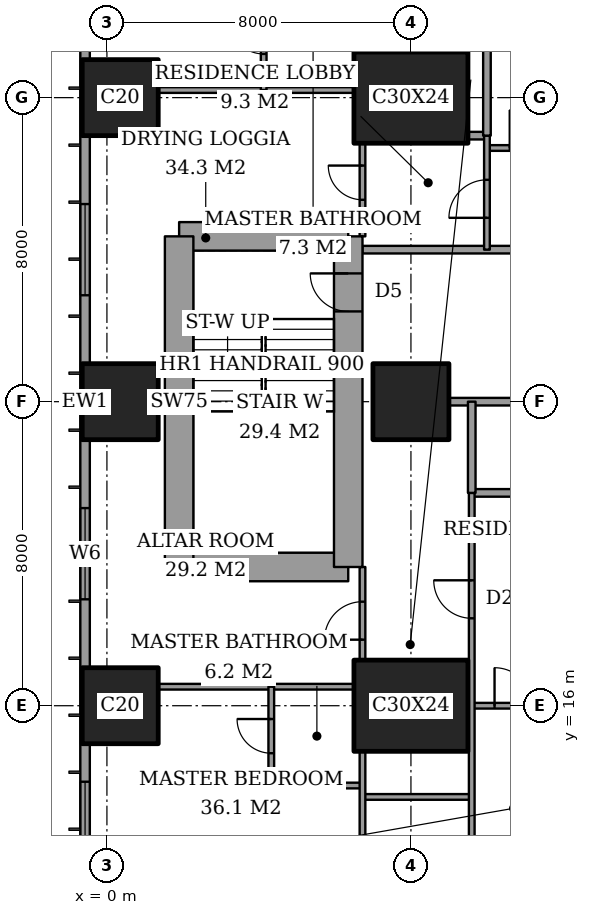
"""IFC4 building model, lengths in metres.
Left out: names, types, materials, properties, quantities, classifications, styles, units other than length and angle.
Written with IfcOpenShell. Run it as: python <this file> out.ifc"""

import sys

from ifc_helpers import new_model, si_unit, direction, frame, frame_2d, origin, origin_2d, place, context, subcontext, project, spatial, rectangle, extrude, element, fill, save


model = new_model("IFC4")
c1 = context("Model", 3, precision=1e-05, world=origin(), true_north=direction((0.0, 1.0)))
c2 = subcontext(c1, "Body", "Model", "MODEL_VIEW")
j1 = project(units=[si_unit("LENGTHUNIT", "METRE"), si_unit("PLANEANGLEUNIT", "RADIAN")], contexts=[c1])
p1 = place(None, origin())
s1 = spatial("IfcSite", under=j1, at=p1, CompositionType="ELEMENT")
p2 = place(p1, origin())
s2 = spatial("IfcBuilding", under=s1, at=p2, CompositionType="ELEMENT")
p3 = place(p2, frame((0.0, 0.0, 83.6)))
s3 = spatial("IfcBuildingStorey", under=s2, at=p3, CompositionType="ELEMENT", Elevation=83.6)
for number, where, z_axis, x_axis in (
    (1, (0.35, 16.0, 0.0), (0.0, 0.0, 1.0), (1.0, 0.0, 0.0)),
    (2, (0.35, 24.0, 0.0), (0.0, 0.0, 1.0), (1.0, 0.0, 0.0)),
    (3, (0.35, 32.0, 0.0), (0.0, 0.0, 1.0), (1.0, 0.0, 0.0)),
):
    element("IfcColumn", number, at=place(p3, frame(where, z_axis=z_axis, x_axis=x_axis)), inside=s3, PredefinedType="COLUMN", context=c2, shape_type="SweptSolid", body=[
        extrude(rectangle(XDim=2.0, YDim=2.0, at=origin_2d()), origin(), (0.0, 0.0, 1.0), 3.6),
    ])
p4 = place(p3, frame((8.0, 16.0, 0.0), z_axis=(0.0, 0.0, 1.0), x_axis=(1.0, 0.0, 0.0)))
e4 = element("IfcColumn", 4, at=p4, inside=s3, PredefinedType="COLUMN", context=c2, shape_type="SweptSolid", body=[
    extrude(rectangle(XDim=3.0, YDim=2.4, at=origin_2d()), origin(), (0.0, 0.0, 1.0), 3.6),
])
p5 = place(p3, frame((8.0, 24.0, 0.0), z_axis=(0.0, 0.0, 1.0), x_axis=(1.0, 0.0, 0.0)))
e5 = element("IfcColumn", 5, at=p5, inside=s3, PredefinedType="COLUMN", context=c2, shape_type="SweptSolid", body=[
    extrude(rectangle(XDim=2.0, YDim=2.0, at=origin_2d()), origin(), (0.0, 0.0, 1.0), 3.6),
])
p6 = place(p3, frame((8.0, 32.0, 0.0), z_axis=(0.0, 0.0, 1.0), x_axis=(1.0, 0.0, 0.0)))
e6 = element("IfcColumn", 6, at=p6, inside=s3, PredefinedType="COLUMN", context=c2, shape_type="SweptSolid", body=[
    extrude(rectangle(XDim=3.0, YDim=2.4, at=origin_2d()), origin(), (0.0, 0.0, 1.0), 3.6),
])
p7 = place(p3, frame((1.9, 19.65, 0.0), z_axis=(0.0, 0.0, 1.0), x_axis=(1.0, 0.0, 0.0)))
e7 = element("IfcWall", 7, at=p7, inside=s3, PredefinedType="SHEAR", context=c2, shape_type="SweptSolid", body=[
    extrude(rectangle(XDim=4.45, YDim=0.75, at=frame_2d((2.225, 0.0))), origin(), (0.0, 0.0, 1.0), 3.6),
])
p8 = place(p3, frame((6.35, 19.65, 0.0), z_axis=(0.0, 0.0, 1.0), x_axis=(0.0, 1.0, 0.0)))
e8 = element("IfcWall", 8, at=p8, inside=s3, PredefinedType="SHEAR", context=c2, shape_type="SweptSolid", body=[
    extrude(rectangle(XDim=8.7, YDim=0.75, at=frame_2d((4.35, 0.0))), origin(), (0.0, 0.0, 1.0), 3.6),
])
p9 = place(p8, frame((6.725, 0.0, 0.0)))
e9 = element("IfcOpeningElement", 9, at=p9, cuts=e8, PredefinedType="OPENING", context=c2, shape_type="SweptSolid", body=[
    extrude(rectangle(XDim=1.0, YDim=2.1, at=frame_2d((0.5, 1.05))), frame((0.0, 0.385, 0.0), z_axis=(0.0, -1.0, 0.0), x_axis=(1.0, 0.0, 0.0)), (0.0, 0.0, 1.0), 0.77),
])
p10 = place(p3, frame((6.35, 28.35, 0.0), z_axis=(0.0, 0.0, 1.0), x_axis=(-1.0, 0.0, 0.0)))
e10 = element("IfcWall", 10, at=p10, inside=s3, PredefinedType="SHEAR", context=c2, shape_type="SweptSolid", body=[
    extrude(rectangle(XDim=4.45, YDim=0.75, at=frame_2d((2.225, 0.0))), origin(), (0.0, 0.0, 1.0), 3.6),
])
p11 = place(p3, frame((1.9, 28.35, 0.0), z_axis=(0.0, 0.0, 1.0), x_axis=(0.0, -1.0, 0.0)))
e11 = element("IfcWall", 11, at=p11, inside=s3, PredefinedType="SHEAR", context=c2, shape_type="SweptSolid", body=[
    extrude(rectangle(XDim=8.7, YDim=0.75, at=frame_2d((4.35, 0.0))), origin(), (0.0, 0.0, 1.0), 3.6),
])
p12 = place(p3, frame((-0.575, 44.825, 0.0), z_axis=(0.0, 0.0, 1.0), x_axis=(0.0, -1.0, 0.0)))
e12 = element("IfcWall", 12, at=p12, inside=s3, PredefinedType="SOLIDWALL", context=c2, shape_type="SweptSolid", body=[
    extrude(rectangle(XDim=41.65, YDim=0.25, at=frame_2d((20.825, 0.0))), origin(), (0.0, 0.0, 1.0), 3.6),
])
p13 = place(p12, frame((0.775, 0.0, 0.6)))
e13 = element("IfcOpeningElement", 13, at=p13, cuts=e12, PredefinedType="OPENING", context=c2, shape_type="SweptSolid", body=[
    extrude(rectangle(XDim=2.4, YDim=2.0, at=frame_2d((1.2, 1.0))), frame((0.0, 0.135, 0.0), z_axis=(0.0, -1.0, 0.0), x_axis=(1.0, 0.0, 0.0)), (0.0, 0.0, 1.0), 0.27),
])
p14 = place(p12, frame((6.1, 0.0, 0.6)))
e14 = element("IfcOpeningElement", 14, at=p14, cuts=e12, PredefinedType="OPENING", context=c2, shape_type="SweptSolid", body=[
    extrude(rectangle(XDim=1.2, YDim=2.0, at=frame_2d((0.6, 1.0))), frame((0.0, 0.135, 0.0), z_axis=(0.0, -1.0, 0.0), x_axis=(1.0, 0.0, 0.0)), (0.0, 0.0, 1.0), 0.27),
])
p15 = place(p12, frame((8.425, 0.0, 0.6)))
e15 = element("IfcOpeningElement", 15, at=p15, cuts=e12, PredefinedType="OPENING", context=c2, shape_type="SweptSolid", body=[
    extrude(rectangle(XDim=2.4, YDim=2.0, at=frame_2d((1.2, 1.0))), frame((0.0, 0.135, 0.0), z_axis=(0.0, -1.0, 0.0), x_axis=(1.0, 0.0, 0.0)), (0.0, 0.0, 1.0), 0.27),
])
p16 = place(p12, frame((15.625, 0.0, 0.6)))
e16 = element("IfcOpeningElement", 16, at=p16, cuts=e12, PredefinedType="OPENING", context=c2, shape_type="SweptSolid", body=[
    extrude(rectangle(XDim=2.4, YDim=2.0, at=frame_2d((1.2, 1.0))), frame((0.0, 0.135, 0.0), z_axis=(0.0, -1.0, 0.0), x_axis=(1.0, 0.0, 0.0)), (0.0, 0.0, 1.0), 0.27),
])
p17 = place(p12, frame((23.625, 0.0, 0.6)))
e17 = element("IfcOpeningElement", 17, at=p17, cuts=e12, PredefinedType="OPENING", context=c2, shape_type="SweptSolid", body=[
    extrude(rectangle(XDim=2.4, YDim=2.0, at=frame_2d((1.2, 1.0))), frame((0.0, 0.135, 0.0), z_axis=(0.0, -1.0, 0.0), x_axis=(1.0, 0.0, 0.0)), (0.0, 0.0, 1.0), 0.27),
])
p18 = place(p12, frame((30.825, 0.0, 0.6)))
e18 = element("IfcOpeningElement", 18, at=p18, cuts=e12, PredefinedType="OPENING", context=c2, shape_type="SweptSolid", body=[
    extrude(rectangle(XDim=2.4, YDim=2.0, at=frame_2d((1.2, 1.0))), frame((0.0, 0.135, 0.0), z_axis=(0.0, -1.0, 0.0), x_axis=(1.0, 0.0, 0.0)), (0.0, 0.0, 1.0), 0.27),
])
p19 = place(p12, frame((34.5, 0.0, 0.6)))
e19 = element("IfcOpeningElement", 19, at=p19, cuts=e12, PredefinedType="OPENING", context=c2, shape_type="SweptSolid", body=[
    extrude(rectangle(XDim=1.2, YDim=2.0, at=frame_2d((0.6, 1.0))), frame((0.0, 0.135, 0.0), z_axis=(0.0, -1.0, 0.0), x_axis=(1.0, 0.0, 0.0)), (0.0, 0.0, 1.0), 0.27),
])
p20 = place(p12, frame((38.475, 0.0, 0.6)))
e20 = element("IfcOpeningElement", 20, at=p20, cuts=e12, PredefinedType="OPENING", context=c2, shape_type="SweptSolid", body=[
    extrude(rectangle(XDim=2.4, YDim=2.0, at=frame_2d((1.2, 1.0))), frame((0.0, 0.135, 0.0), z_axis=(0.0, -1.0, 0.0), x_axis=(1.0, 0.0, 0.0)), (0.0, 0.0, 1.0), 0.27),
])
p21 = place(p3, frame((6.725, 13.6, 0.0), z_axis=(0.0, 0.0, 1.0), x_axis=(1.0, 0.0, 0.0)))
e21 = element("IfcWall", 21, at=p21, inside=s3, PredefinedType="PARTITIONING", context=c2, shape_type="SweptSolid", body=[
    extrude(rectangle(XDim=2.875, YDim=0.15, at=frame_2d((1.438, 0.0))), origin(), (0.0, 0.0, 1.0), 3.35),
])
p22 = place(p3, frame((4.325, 13.9, 0.0), z_axis=(0.0, 0.0, 1.0), x_axis=(1.0, 0.0, 0.0)))
e22 = element("IfcWall", 22, at=p22, inside=s3, PredefinedType="PARTITIONING", context=c2, shape_type="SweptSolid", body=[
    extrude(rectangle(XDim=2.4, YDim=0.15, at=frame_2d((1.2, 0.0))), origin(), (0.0, 0.0, 1.0), 3.35),
])
p23 = place(p3, frame((9.6, 16.0, 0.0), z_axis=(0.0, 0.0, 1.0), x_axis=(1.0, 0.0, 0.0)))
e23 = element("IfcWall", 23, at=p23, inside=s3, PredefinedType="PARTITIONING", context=c2, shape_type="SweptSolid", body=[
    extrude(rectangle(XDim=4.9, YDim=0.15, at=frame_2d((2.45, 0.0))), origin(), (0.0, 0.0, 1.0), 2.634),
])
p24 = place(p23, frame((0.6, 0.0, 0.0)))
e24 = element("IfcOpeningElement", 24, at=p24, cuts=e23, PredefinedType="OPENING", context=c2, shape_type="SweptSolid", body=[
    extrude(rectangle(XDim=1.0, YDim=2.1, at=frame_2d((0.5, 1.05))), frame((0.0, 0.085, 0.0), z_axis=(0.0, -1.0, 0.0), x_axis=(1.0, 0.0, 0.0)), (0.0, 0.0, 1.0), 0.17),
])
p25 = place(p3, frame((1.35, 16.5, 0.0), z_axis=(0.0, 0.0, 1.0), x_axis=(1.0, 0.0, 0.0)))
e25 = element("IfcWall", 25, at=p25, inside=s3, PredefinedType="PARTITIONING", context=c2, shape_type="SweptSolid", body=[
    extrude(rectangle(XDim=5.15, YDim=0.15, at=frame_2d((2.575, 0.0))), origin(), (0.0, 0.0, 1.0), 3.35),
])
p26 = place(p3, frame((9.6, 21.6, 0.0), z_axis=(0.0, 0.0, 1.0), x_axis=(1.0, 0.0, 0.0)))
e26 = element("IfcWall", 26, at=p26, inside=s3, PredefinedType="PARTITIONING", context=c2, shape_type="SweptSolid", body=[
    extrude(rectangle(XDim=5.2, YDim=0.2, at=frame_2d((2.6, 0.0))), origin(), (0.0, 0.0, 1.0), 3.35),
])
p27 = place(p26, frame((2.15, 0.0, 0.0)))
e27 = element("IfcOpeningElement", 27, at=p27, cuts=e26, PredefinedType="OPENING", context=c2, shape_type="SweptSolid", body=[
    extrude(rectangle(XDim=0.9, YDim=2.1, at=frame_2d((0.45, 1.05))), frame((0.0, 0.11, 0.0), z_axis=(0.0, -1.0, 0.0), x_axis=(1.0, 0.0, 0.0)), (0.0, 0.0, 1.0), 0.22),
])
p28 = place(p3, frame((9.0, 24.0, 0.0), z_axis=(0.0, 0.0, 1.0), x_axis=(1.0, 0.0, 0.0)))
e28 = element("IfcWall", 28, at=p28, inside=s3, PredefinedType="PARTITIONING", context=c2, shape_type="SweptSolid", body=[
    extrude(rectangle(XDim=6.0, YDim=0.2, at=frame_2d((3.0, 0.0))), origin(), (0.0, 0.0, 1.0), 3.35),
])
p29 = place(p3, frame((6.725, 28.0, 0.0), z_axis=(0.0, 0.0, 1.0), x_axis=(1.0, 0.0, 0.0)))
e29 = element("IfcWall", 29, at=p29, inside=s3, PredefinedType="PARTITIONING", context=c2, shape_type="SweptSolid", body=[
    extrude(rectangle(XDim=17.275, YDim=0.2, at=frame_2d((8.637, 0.0))), origin(), (0.0, 0.0, 1.0), 3.35),
])
p30 = place(p29, frame((6.675, 0.0, 0.0)))
e30 = element("IfcOpeningElement", 30, at=p30, cuts=e29, PredefinedType="OPENING", context=c2, shape_type="SweptSolid", body=[
    extrude(rectangle(XDim=1.2, YDim=2.4, at=frame_2d((0.6, 1.2))), frame((0.0, 0.11, 0.0), z_axis=(0.0, -1.0, 0.0), x_axis=(1.0, 0.0, 0.0)), (0.0, 0.0, 1.0), 0.22),
])
p31 = place(p3, frame((10.0, 30.675, 0.0), z_axis=(0.0, 0.0, 1.0), x_axis=(1.0, 0.0, 0.0)))
e31 = element("IfcWall", 31, at=p31, inside=s3, PredefinedType="PARTITIONING", context=c2, shape_type="SweptSolid", body=[
    extrude(rectangle(XDim=4.4, YDim=0.15, at=frame_2d((2.2, 0.0))), origin(), (0.0, 0.0, 1.0), 3.35),
])
p32 = place(p31, frame((0.6, 0.0, 0.0)))
e32 = element("IfcOpeningElement", 32, at=p32, cuts=e31, PredefinedType="OPENING", context=c2, shape_type="SweptSolid", body=[
    extrude(rectangle(XDim=1.0, YDim=2.1, at=frame_2d((0.5, 1.05))), frame((0.0, 0.085, 0.0), z_axis=(0.0, -1.0, 0.0), x_axis=(1.0, 0.0, 0.0)), (0.0, 0.0, 1.0), 0.17),
])
p33 = place(p3, frame((9.5, 31.0, 0.0), z_axis=(0.0, 0.0, 1.0), x_axis=(1.0, 0.0, 0.0)))
e33 = element("IfcWall", 33, at=p33, inside=s3, PredefinedType="PARTITIONING", context=c2, shape_type="SweptSolid", body=[
    extrude(rectangle(XDim=0.5, YDim=0.2, at=frame_2d((0.25, 0.0))), origin(), (0.0, 0.0, 1.0), 3.35),
])
p34 = place(p3, frame((1.35, 32.2, 0.0), z_axis=(0.0, 0.0, 1.0), x_axis=(1.0, 0.0, 0.0)))
e34 = element("IfcWall", 34, at=p34, inside=s3, PredefinedType="PARTITIONING", context=c2, shape_type="SweptSolid", body=[
    extrude(rectangle(XDim=5.15, YDim=0.15, at=frame_2d((2.575, 0.0))), origin(), (0.0, 0.0, 1.0), 3.35),
])
p35 = place(p3, frame((4.125, 32.2, 0.0), z_axis=(0.0, 0.0, 1.0), x_axis=(0.0, 1.0, 0.0)))
e35 = element("IfcWall", 35, at=p35, inside=s3, PredefinedType="PARTITIONING", context=c2, shape_type="SweptSolid", body=[
    extrude(rectangle(XDim=2.8, YDim=0.15, at=frame_2d((1.4, 0.0))), origin(), (0.0, 0.0, 1.0), 3.35),
])
p36 = place(p35, frame((0.95, 0.0, 0.0)))
e36 = element("IfcOpeningElement", 36, at=p36, cuts=e35, PredefinedType="OPENING", context=c2, shape_type="SweptSolid", body=[
    extrude(rectangle(XDim=0.9, YDim=2.1, at=frame_2d((0.45, 1.05))), frame((0.0, 0.085, 0.0), z_axis=(0.0, -1.0, 0.0), x_axis=(1.0, 0.0, 0.0)), (0.0, 0.0, 1.0), 0.17),
])
p37 = place(p3, frame((4.325, 13.9, 0.0), z_axis=(0.0, 0.0, 1.0), x_axis=(0.0, 1.0, 0.0)))
e37 = element("IfcWall", 37, at=p37, inside=s3, PredefinedType="PARTITIONING", context=c2, shape_type="SweptSolid", body=[
    extrude(rectangle(XDim=2.6, YDim=0.15, at=frame_2d((1.3, 0.0))), origin(), (0.0, 0.0, 1.0), 3.35),
])
p38 = place(p37, frame((0.85, 0.0, 0.0)))
e38 = element("IfcOpeningElement", 38, at=p38, cuts=e37, PredefinedType="OPENING", context=c2, shape_type="SweptSolid", body=[
    extrude(rectangle(XDim=0.9, YDim=2.1, at=frame_2d((0.45, 1.05))), frame((0.0, 0.085, 0.0), z_axis=(0.0, -1.0, 0.0), x_axis=(1.0, 0.0, 0.0)), (0.0, 0.0, 1.0), 0.17),
])
p39 = place(p3, frame((6.725, 10.6, 0.0), z_axis=(0.0, 0.0, 1.0), x_axis=(0.0, 1.0, 0.0)))
e39 = element("IfcWall", 39, at=p39, inside=s3, PredefinedType="PARTITIONING", context=c2, shape_type="SweptSolid", body=[
    extrude(rectangle(XDim=4.2, YDim=0.15, at=frame_2d((2.1, 0.0))), origin(), (0.0, 0.0, 1.0), 3.35),
])
p40 = place(p39, frame((1.05, 0.0, 0.0)))
e40 = element("IfcOpeningElement", 40, at=p40, cuts=e39, PredefinedType="OPENING", context=c2, shape_type="SweptSolid", body=[
    extrude(rectangle(XDim=0.9, YDim=2.1, at=frame_2d((0.45, 1.05))), frame((0.0, 0.085, 0.0), z_axis=(0.0, -1.0, 0.0), x_axis=(1.0, 0.0, 0.0)), (0.0, 0.0, 1.0), 0.17),
])
p41 = place(p3, frame((6.725, 17.2, 0.0), z_axis=(0.0, 0.0, 1.0), x_axis=(0.0, 1.0, 0.0)))
e41 = element("IfcWall", 41, at=p41, inside=s3, PredefinedType="PARTITIONING", context=c2, shape_type="SweptSolid", body=[
    extrude(rectangle(XDim=2.45, YDim=0.15, at=frame_2d((1.225, 0.0))), origin(), (0.0, 0.0, 1.0), 3.35),
])
p42 = place(p41, frame((0.538, 0.0, 0.0)))
e42 = element("IfcOpeningElement", 42, at=p42, cuts=e41, PredefinedType="OPENING", context=c2, shape_type="SweptSolid", body=[
    extrude(rectangle(XDim=1.0, YDim=2.1, at=frame_2d((0.5, 1.05))), frame((0.0, 0.085, 0.0), z_axis=(0.0, -1.0, 0.0), x_axis=(1.0, 0.0, 0.0)), (0.0, 0.0, 1.0), 0.17),
])
p43 = place(p3, frame((6.725, 28.35, 0.0), z_axis=(0.0, 0.0, 1.0), x_axis=(0.0, 1.0, 0.0)))
e43 = element("IfcWall", 43, at=p43, inside=s3, PredefinedType="PARTITIONING", context=c2, shape_type="SweptSolid", body=[
    extrude(rectangle(XDim=2.45, YDim=0.15, at=frame_2d((1.225, 0.0))), origin(), (0.0, 0.0, 1.0), 3.35),
])
p44 = place(p43, frame((0.962, 0.0, 0.0)))
e44 = element("IfcOpeningElement", 44, at=p44, cuts=e43, PredefinedType="OPENING", context=c2, shape_type="SweptSolid", body=[
    extrude(rectangle(XDim=0.9, YDim=2.1, at=frame_2d((0.45, 1.05))), frame((0.0, 0.085, 0.0), z_axis=(0.0, -1.0, 0.0), x_axis=(1.0, 0.0, 0.0)), (0.0, 0.0, 1.0), 0.17),
])
p45 = place(p3, frame((9.6, 21.6, 0.0), z_axis=(0.0, 0.0, 1.0), x_axis=(0.0, 1.0, 0.0)))
e45 = element("IfcWall", 45, at=p45, inside=s3, PredefinedType="PARTITIONING", context=c2, shape_type="SweptSolid", body=[
    extrude(rectangle(XDim=2.4, YDim=0.2, at=frame_2d((1.2, 0.0))), origin(), (0.0, 0.0, 1.0), 3.35),
])
p46 = place(p3, frame((9.6, 10.6, 0.0), z_axis=(0.0, 0.0, 1.0), x_axis=(0.0, 1.0, 0.0)))
e46 = element("IfcWall", 46, at=p46, inside=s3, PredefinedType="PARTITIONING", context=c2, shape_type="SweptSolid", body=[
    extrude(rectangle(XDim=11.0, YDim=0.15, at=frame_2d((5.5, 0.0))), origin(), (0.0, 0.0, 1.0), 3.35),
])
p47 = place(p46, frame((7.7, 0.0, 0.0)))
e47 = element("IfcOpeningElement", 47, at=p47, cuts=e46, PredefinedType="OPENING", context=c2, shape_type="SweptSolid", body=[
    extrude(rectangle(XDim=1.0, YDim=2.1, at=frame_2d((0.5, 1.05))), frame((0.0, 0.085, 0.0), z_axis=(0.0, -1.0, 0.0), x_axis=(1.0, 0.0, 0.0)), (0.0, 0.0, 1.0), 0.17),
])
p48 = place(p3, frame((10.0, 31.0, 0.0), z_axis=(0.0, 0.0, 1.0), x_axis=(0.0, 1.0, 0.0)))
e48 = element("IfcWall", 48, at=p48, inside=s3, PredefinedType="PARTITIONING", context=c2, shape_type="SweptSolid", body=[
    extrude(rectangle(XDim=6.4, YDim=0.2, at=frame_2d((3.2, 0.0))), origin(), (0.0, 0.0, 1.0), 3.35),
])
p49 = place(p3, frame((10.0, 28.0, 0.0), z_axis=(0.0, 0.0, 1.0), x_axis=(0.0, 1.0, 0.0)))
e49 = element("IfcWall", 49, at=p49, inside=s3, PredefinedType="PARTITIONING", context=c2, shape_type="SweptSolid", body=[
    extrude(rectangle(XDim=3.0, YDim=0.15, at=frame_2d((1.5, 0.0))), origin(), (0.0, 0.0, 1.0), 3.35),
])
p50 = place(p49, frame((0.837, 0.0, 0.0)))
e50 = element("IfcOpeningElement", 50, at=p50, cuts=e49, PredefinedType="OPENING", context=c2, shape_type="SweptSolid", body=[
    extrude(rectangle(XDim=1.0, YDim=2.1, at=frame_2d((0.5, 1.05))), frame((0.0, 0.085, 0.0), z_axis=(0.0, -1.0, 0.0), x_axis=(1.0, 0.0, 0.0)), (0.0, 0.0, 1.0), 0.17),
])
p51 = place(p16, origin())
e51 = element("IfcWindow", 51, at=p51, inside=s3, PartitioningType="SINGLE_PANEL", PredefinedType="WINDOW", context=c2, shape_type="SweptSolid", body=[
    extrude(rectangle(XDim=2.4, YDim=2.0, at=frame_2d((1.2, 1.0))), frame((0.0, 0.03, 0.0), z_axis=(0.0, -1.0, 0.0), x_axis=(1.0, 0.0, 0.0)), (0.0, 0.0, 1.0), 0.06),
])
fill(e16, e51)
p52 = place(p17, origin())
e52 = element("IfcWindow", 52, at=p52, inside=s3, PartitioningType="SINGLE_PANEL", PredefinedType="WINDOW", context=c2, shape_type="SweptSolid", body=[
    extrude(rectangle(XDim=2.4, YDim=2.0, at=frame_2d((1.2, 1.0))), frame((0.0, 0.03, 0.0), z_axis=(0.0, -1.0, 0.0), x_axis=(1.0, 0.0, 0.0)), (0.0, 0.0, 1.0), 0.06),
])
fill(e17, e52)
p53 = place(p18, origin())
e53 = element("IfcWindow", 53, at=p53, inside=s3, PartitioningType="SINGLE_PANEL", PredefinedType="WINDOW", context=c2, shape_type="SweptSolid", body=[
    extrude(rectangle(XDim=2.4, YDim=2.0, at=frame_2d((1.2, 1.0))), frame((0.0, 0.03, 0.0), z_axis=(0.0, -1.0, 0.0), x_axis=(1.0, 0.0, 0.0)), (0.0, 0.0, 1.0), 0.06),
])
fill(e18, e53)
p54 = place(p38, origin())
e54 = element("IfcDoor", 54, at=p54, inside=s3, OperationType="SINGLE_SWING_LEFT", PredefinedType="DOOR", context=c2, shape_type="SweptSolid", body=[
    extrude(rectangle(XDim=0.9, YDim=2.1, at=frame_2d((0.45, 1.05))), frame((0.0, 0.025, 0.0), z_axis=(0.0, -1.0, 0.0), x_axis=(1.0, 0.0, 0.0)), (0.0, 0.0, 1.0), 0.05),
])
fill(e38, e54)
p55 = place(p42, origin())
e55 = element("IfcDoor", 55, at=p55, inside=s3, OperationType="SINGLE_SWING_RIGHT", PredefinedType="DOOR", context=c2, shape_type="SweptSolid", body=[
    extrude(rectangle(XDim=1.0, YDim=2.1, at=frame_2d((0.5, 1.05))), frame((0.0, 0.025, 0.0), z_axis=(0.0, -1.0, 0.0), x_axis=(1.0, 0.0, 0.0)), (0.0, 0.0, 1.0), 0.05),
])
fill(e42, e55)
p56 = place(p47, origin())
e56 = element("IfcDoor", 56, at=p56, inside=s3, OperationType="SINGLE_SWING_LEFT", PredefinedType="DOOR", context=c2, shape_type="SweptSolid", body=[
    extrude(rectangle(XDim=1.0, YDim=2.1, at=frame_2d((0.5, 1.05))), frame((0.0, 0.025, 0.0), z_axis=(0.0, -1.0, 0.0), x_axis=(1.0, 0.0, 0.0)), (0.0, 0.0, 1.0), 0.05),
])
fill(e47, e56)
p57 = place(p24, origin())
e57 = element("IfcDoor", 57, at=p57, inside=s3, OperationType="SINGLE_SWING_RIGHT", PredefinedType="DOOR", context=c2, shape_type="SweptSolid", body=[
    extrude(rectangle(XDim=1.0, YDim=2.1, at=frame_2d((0.5, 1.05))), frame((0.0, 0.025, 0.0), z_axis=(0.0, -1.0, 0.0), x_axis=(1.0, 0.0, 0.0)), (0.0, 0.0, 1.0), 0.05),
])
fill(e24, e57)
p58 = place(p36, origin())
e58 = element("IfcDoor", 58, at=p58, inside=s3, OperationType="SINGLE_SWING_LEFT", PredefinedType="DOOR", context=c2, shape_type="SweptSolid", body=[
    extrude(rectangle(XDim=0.9, YDim=2.1, at=frame_2d((0.45, 1.05))), frame((0.0, 0.025, 0.0), z_axis=(0.0, -1.0, 0.0), x_axis=(1.0, 0.0, 0.0)), (0.0, 0.0, 1.0), 0.05),
])
fill(e36, e58)
p59 = place(p44, origin())
e59 = element("IfcDoor", 59, at=p59, inside=s3, OperationType="SINGLE_SWING_LEFT", PredefinedType="DOOR", context=c2, shape_type="SweptSolid", body=[
    extrude(rectangle(XDim=0.9, YDim=2.1, at=frame_2d((0.45, 1.05))), frame((0.0, 0.025, 0.0), z_axis=(0.0, -1.0, 0.0), x_axis=(1.0, 0.0, 0.0)), (0.0, 0.0, 1.0), 0.05),
])
fill(e44, e59)
p60 = place(p50, origin())
e60 = element("IfcDoor", 60, at=p60, inside=s3, OperationType="SINGLE_SWING_RIGHT", PredefinedType="DOOR", context=c2, shape_type="SweptSolid", body=[
    extrude(rectangle(XDim=1.0, YDim=2.1, at=frame_2d((0.5, 1.05))), frame((0.0, 0.025, 0.0), z_axis=(0.0, -1.0, 0.0), x_axis=(1.0, 0.0, 0.0)), (0.0, 0.0, 1.0), 0.05),
])
fill(e50, e60)
p61 = place(p9, origin())
e61 = element("IfcDoor", 61, at=p61, inside=s3, OperationType="SINGLE_SWING_LEFT", PredefinedType="DOOR", context=c2, shape_type="SweptSolid", body=[
    extrude(rectangle(XDim=1.0, YDim=2.1, at=frame_2d((0.5, 1.05))), frame((0.0, 0.025, 0.0), z_axis=(0.0, -1.0, 0.0), x_axis=(1.0, 0.0, 0.0)), (0.0, 0.0, 1.0), 0.05),
])
fill(e9, e61)
save(model, sys.argv[1])
